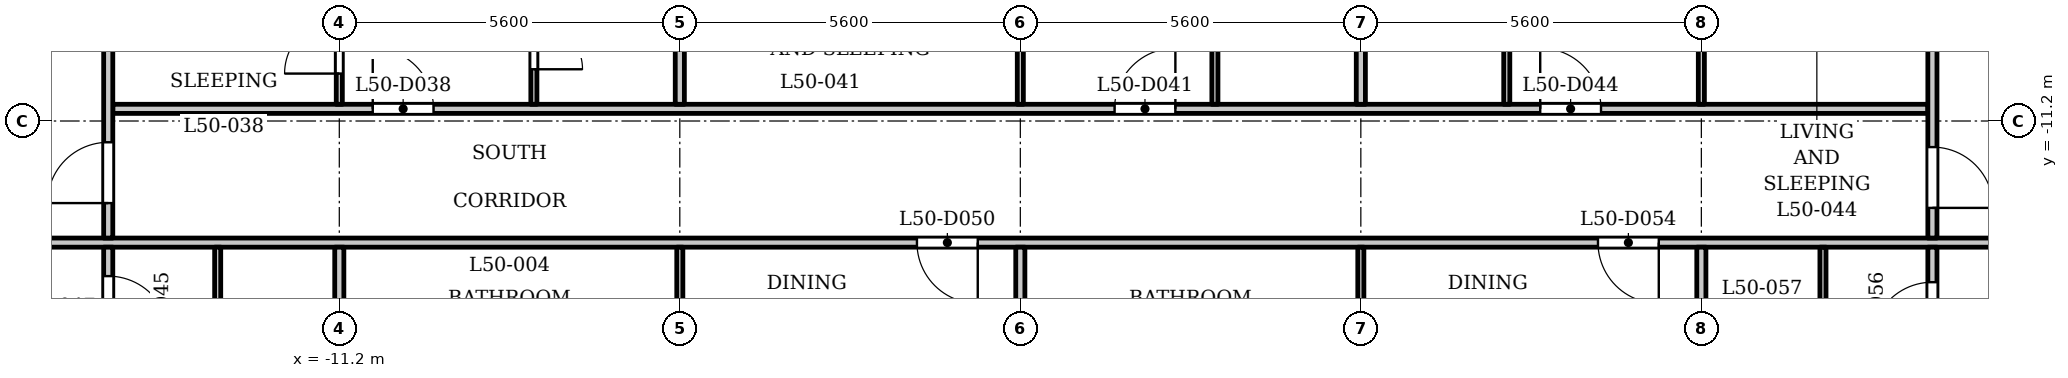
"""IFC4 building model, lengths in metres.
Left out: names, types, materials, properties, quantities, classifications, styles, units other than length and angle.
Written with IfcOpenShell. Run it as: python <this file> out.ifc"""

import sys

from ifc_helpers import new_model, si_unit, direction, frame, frame_2d, origin, place, context, subcontext, project, spatial, rectangle, extrude, element, fill, save


model = new_model("IFC4")
c1 = context("Model", 3, precision=1e-05, world=origin(), true_north=direction((0.0, 1.0)))
c2 = subcontext(c1, "Body", "Model", "MODEL_VIEW")
j1 = project(units=[si_unit("LENGTHUNIT", "METRE"), si_unit("PLANEANGLEUNIT", "RADIAN")], contexts=[c1])
p1 = place(None, origin())
s1 = spatial("IfcSite", under=j1, at=p1, CompositionType="ELEMENT")
p2 = place(p1, origin())
s2 = spatial("IfcBuilding", under=s1, at=p2, CompositionType="ELEMENT")
p3 = place(p2, frame((0.0, 0.0, 195.9)))
s3 = spatial("IfcBuildingStorey", under=s2, at=p3, CompositionType="ELEMENT", Elevation=195.9)
p4 = place(p3, frame((-17.4, -13.2, 0.0), z_axis=(0.0, 0.0, 1.0), x_axis=(1.0, 0.0, 0.0)))
e1 = element("IfcWall", 1, at=p4, inside=s3, PredefinedType="PARTITIONING", context=c2, shape_type="SweptSolid", body=[
    extrude(rectangle(XDim=34.8, YDim=0.15, at=frame_2d((17.4, 0.0))), origin(), (0.0, 0.0, 1.0), 3.2),
])
p5 = place(p4, frame((0.15, 0.0, 0.0)))
e2 = element("IfcOpeningElement", 2, at=p5, cuts=e1, PredefinedType="OPENING", context=c2, shape_type="SweptSolid", body=[
    extrude(rectangle(XDim=1.0, YDim=2.1, at=frame_2d((0.5, 1.05))), frame((0.0, 0.085, 0.0), z_axis=(0.0, -1.0, 0.0), x_axis=(1.0, 0.0, 0.0)), (0.0, 0.0, 1.0), 0.17),
])
p6 = place(p4, frame((33.55, 0.0, 0.0)))
e3 = element("IfcOpeningElement", 3, at=p6, cuts=e1, PredefinedType="OPENING", context=c2, shape_type="SweptSolid", body=[
    extrude(rectangle(XDim=1.0, YDim=2.1, at=frame_2d((0.5, 1.05))), frame((0.0, 0.085, 0.0), z_axis=(0.0, -1.0, 0.0), x_axis=(1.0, 0.0, 0.0)), (0.0, 0.0, 1.0), 0.17),
])
p7 = place(p4, frame((15.7, 0.0, 0.0)))
e4 = element("IfcOpeningElement", 4, at=p7, cuts=e1, PredefinedType="OPENING", context=c2, shape_type="SweptSolid", body=[
    extrude(rectangle(XDim=1.0, YDim=2.1, at=frame_2d((0.5, 1.05))), frame((0.0, 0.085, 0.0), z_axis=(0.0, -1.0, 0.0), x_axis=(1.0, 0.0, 0.0)), (0.0, 0.0, 1.0), 0.17),
])
p8 = place(p4, frame((26.9, 0.0, 0.0)))
e5 = element("IfcOpeningElement", 5, at=p8, cuts=e1, PredefinedType="OPENING", context=c2, shape_type="SweptSolid", body=[
    extrude(rectangle(XDim=1.0, YDim=2.1, at=frame_2d((0.5, 1.05))), frame((0.0, 0.085, 0.0), z_axis=(0.0, -1.0, 0.0), x_axis=(1.0, 0.0, 0.0)), (0.0, 0.0, 1.0), 0.17),
])
p9 = place(p3, frame((-14.925, -11.0, 0.0), z_axis=(0.0, 0.0, 1.0), x_axis=(1.0, 0.0, 0.0)))
e6 = element("IfcWall", 6, at=p9, inside=s3, PredefinedType="PARTITIONING", context=c2, shape_type="SweptSolid", body=[
    extrude(rectangle(XDim=29.85, YDim=0.15, at=frame_2d((14.925, 0.0))), origin(), (0.0, 0.0, 1.0), 3.2),
])
p10 = place(p9, frame((4.275, 0.0, 0.0)))
e7 = element("IfcOpeningElement", 7, at=p10, cuts=e6, PredefinedType="OPENING", context=c2, shape_type="SweptSolid", body=[
    extrude(rectangle(XDim=1.0, YDim=2.1, at=frame_2d((0.5, 1.05))), frame((0.0, 0.085, 0.0), z_axis=(0.0, -1.0, 0.0), x_axis=(1.0, 0.0, 0.0)), (0.0, 0.0, 1.0), 0.17),
])
p11 = place(p9, frame((16.475, 0.0, 0.0)))
e8 = element("IfcOpeningElement", 8, at=p11, cuts=e6, PredefinedType="OPENING", context=c2, shape_type="SweptSolid", body=[
    extrude(rectangle(XDim=1.0, YDim=2.1, at=frame_2d((0.5, 1.05))), frame((0.0, 0.085, 0.0), z_axis=(0.0, -1.0, 0.0), x_axis=(1.0, 0.0, 0.0)), (0.0, 0.0, 1.0), 0.17),
])
p12 = place(p9, frame((23.475, 0.0, 0.0)))
e9 = element("IfcOpeningElement", 9, at=p12, cuts=e6, PredefinedType="OPENING", context=c2, shape_type="SweptSolid", body=[
    extrude(rectangle(XDim=1.0, YDim=2.1, at=frame_2d((0.5, 1.05))), frame((0.0, 0.085, 0.0), z_axis=(0.0, -1.0, 0.0), x_axis=(1.0, 0.0, 0.0)), (0.0, 0.0, 1.0), 0.17),
])
p13 = place(p3, frame((-15.0, -15.325, 0.0), z_axis=(0.0, 0.0, 1.0), x_axis=(0.0, 1.0, 0.0)))
e10 = element("IfcWall", 10, at=p13, inside=s3, PredefinedType="PARTITIONING", context=c2, shape_type="SweptSolid", body=[
    extrude(rectangle(XDim=2.05, YDim=0.15, at=frame_2d((1.025, 0.0))), origin(), (0.0, 0.0, 1.0), 3.2),
])
p14 = place(p13, frame((0.574, 0.0, 0.0)))
e11 = element("IfcOpeningElement", 11, at=p14, cuts=e10, PredefinedType="OPENING", context=c2, shape_type="SweptSolid", body=[
    extrude(rectangle(XDim=1.0, YDim=2.1, at=frame_2d((0.5, 1.05))), frame((0.0, 0.085, 0.0), z_axis=(0.0, -1.0, 0.0), x_axis=(1.0, 0.0, 0.0)), (0.0, 0.0, 1.0), 0.17),
])
p15 = place(p3, frame((-15.0, -13.125, 0.0), z_axis=(0.0, 0.0, 1.0), x_axis=(0.0, 1.0, 0.0)))
e12 = element("IfcWall", 12, at=p15, inside=s3, PredefinedType="PARTITIONING", context=c2, shape_type="SweptSolid", body=[
    extrude(rectangle(XDim=6.356, YDim=0.15, at=frame_2d((3.178, 0.0))), origin(), (0.0, 0.0, 1.0), 3.2),
])
p16 = place(p15, frame((0.575, 0.0, 0.0)))
e13 = element("IfcOpeningElement", 13, at=p16, cuts=e12, PredefinedType="OPENING", context=c2, shape_type="SweptSolid", body=[
    extrude(rectangle(XDim=1.0, YDim=2.1, at=frame_2d((0.5, 1.05))), frame((0.0, 0.085, 0.0), z_axis=(0.0, -1.0, 0.0), x_axis=(1.0, 0.0, 0.0)), (0.0, 0.0, 1.0), 0.17),
])
p17 = place(p3, frame((-13.2, -15.55, 0.0), z_axis=(0.0, 0.0, 1.0), x_axis=(0.0, 1.0, 0.0)))
e14 = element("IfcWall", 14, at=p17, inside=s3, PredefinedType="PARTITIONING", context=c2, shape_type="SweptSolid", body=[
    extrude(rectangle(XDim=2.275, YDim=0.1, at=frame_2d((1.138, 0.0))), origin(), (0.0, 0.0, 1.0), 3.2),
])
p18 = place(p3, frame((-11.2, -10.925, 0.0), z_axis=(0.0, 0.0, 1.0), x_axis=(0.0, 1.0, 0.0)))
e15 = element("IfcWall", 15, at=p18, inside=s3, PredefinedType="PARTITIONING", context=c2, shape_type="SweptSolid", body=[
    extrude(rectangle(XDim=3.605, YDim=0.1, at=frame_2d((1.802, 0.0))), origin(), (0.0, 0.0, 1.0), 3.2),
])
p19 = place(p18, frame((0.505, 0.0, 0.0)))
e16 = element("IfcOpeningElement", 16, at=p19, cuts=e15, PredefinedType="OPENING", context=c2, shape_type="SweptSolid", body=[
    extrude(rectangle(XDim=0.9, YDim=2.1, at=frame_2d((0.45, 1.05))), frame((0.0, 0.06, 0.0), z_axis=(0.0, -1.0, 0.0), x_axis=(1.0, 0.0, 0.0)), (0.0, 0.0, 1.0), 0.12),
])
p20 = place(p3, frame((-11.2, -15.55, 0.0), z_axis=(0.0, 0.0, 1.0), x_axis=(0.0, 1.0, 0.0)))
e17 = element("IfcWall", 17, at=p20, inside=s3, PredefinedType="PARTITIONING", context=c2, shape_type="SweptSolid", body=[
    extrude(rectangle(XDim=2.275, YDim=0.15, at=frame_2d((1.138, 0.0))), origin(), (0.0, 0.0, 1.0), 3.2),
])
p21 = place(p3, frame((-8.0, -10.925, 0.0), z_axis=(0.0, 0.0, 1.0), x_axis=(0.0, 1.0, 0.0)))
e18 = element("IfcWall", 18, at=p21, inside=s3, PredefinedType="PARTITIONING", context=c2, shape_type="SweptSolid", body=[
    extrude(rectangle(XDim=3.605, YDim=0.1, at=frame_2d((1.802, 0.0))), origin(), (0.0, 0.0, 1.0), 3.2),
])
p22 = place(p21, frame((0.576, 0.0, 0.0)))
e19 = element("IfcOpeningElement", 19, at=p22, cuts=e18, PredefinedType="OPENING", context=c2, shape_type="SweptSolid", body=[
    extrude(rectangle(XDim=0.8, YDim=2.1, at=frame_2d((0.4, 1.05))), frame((0.0, 0.06, 0.0), z_axis=(0.0, -1.0, 0.0), x_axis=(1.0, 0.0, 0.0)), (0.0, 0.0, 1.0), 0.12),
])
p23 = place(p3, frame((-5.6, -15.55, 0.0), z_axis=(0.0, 0.0, 1.0), x_axis=(0.0, 1.0, 0.0)))
e20 = element("IfcWall", 20, at=p23, inside=s3, PredefinedType="PARTITIONING", context=c2, shape_type="SweptSolid", body=[
    extrude(rectangle(XDim=2.275, YDim=0.1, at=frame_2d((1.138, 0.0))), origin(), (0.0, 0.0, 1.0), 3.2),
])
p24 = place(p3, frame((-5.6, -10.925, 0.0), z_axis=(0.0, 0.0, 1.0), x_axis=(0.0, 1.0, 0.0)))
e21 = element("IfcWall", 21, at=p24, inside=s3, PredefinedType="PARTITIONING", context=c2, shape_type="SweptSolid", body=[
    extrude(rectangle(XDim=3.605, YDim=0.15, at=frame_2d((1.802, 0.0))), origin(), (0.0, 0.0, 1.0), 3.2),
])
p25 = place(p3, frame((0.0, -10.925, 0.0), z_axis=(0.0, 0.0, 1.0), x_axis=(0.0, 1.0, 0.0)))
e22 = element("IfcWall", 22, at=p25, inside=s3, PredefinedType="PARTITIONING", context=c2, shape_type="SweptSolid", body=[
    extrude(rectangle(XDim=3.605, YDim=0.1, at=frame_2d((1.802, 0.0))), origin(), (0.0, 0.0, 1.0), 3.2),
])
p26 = place(p25, frame((1.005, 0.0, 0.0)))
e23 = element("IfcOpeningElement", 23, at=p26, cuts=e22, PredefinedType="OPENING", context=c2, shape_type="SweptSolid", body=[
    extrude(rectangle(XDim=0.9, YDim=2.1, at=frame_2d((0.45, 1.05))), frame((0.0, 0.06, 0.0), z_axis=(0.0, -1.0, 0.0), x_axis=(1.0, 0.0, 0.0)), (0.0, 0.0, 1.0), 0.12),
])
p27 = place(p3, frame((0.0, -15.55, 0.0), z_axis=(0.0, 0.0, 1.0), x_axis=(0.0, 1.0, 0.0)))
e24 = element("IfcWall", 24, at=p27, inside=s3, PredefinedType="PARTITIONING", context=c2, shape_type="SweptSolid", body=[
    extrude(rectangle(XDim=2.275, YDim=0.15, at=frame_2d((1.138, 0.0))), origin(), (0.0, 0.0, 1.0), 3.2),
])
p28 = place(p3, frame((3.2, -10.925, 0.0), z_axis=(0.0, 0.0, 1.0), x_axis=(0.0, 1.0, 0.0)))
e25 = element("IfcWall", 25, at=p28, inside=s3, PredefinedType="PARTITIONING", context=c2, shape_type="SweptSolid", body=[
    extrude(rectangle(XDim=3.605, YDim=0.1, at=frame_2d((1.802, 0.0))), origin(), (0.0, 0.0, 1.0), 3.2),
])
p29 = place(p28, frame((2.326, 0.0, 0.0)))
e26 = element("IfcOpeningElement", 26, at=p29, cuts=e25, PredefinedType="OPENING", context=c2, shape_type="SweptSolid", body=[
    extrude(rectangle(XDim=0.8, YDim=2.1, at=frame_2d((0.4, 1.05))), frame((0.0, 0.06, 0.0), z_axis=(0.0, -1.0, 0.0), x_axis=(1.0, 0.0, 0.0)), (0.0, 0.0, 1.0), 0.12),
])
p30 = place(p3, frame((5.6, -15.55, 0.0), z_axis=(0.0, 0.0, 1.0), x_axis=(0.0, 1.0, 0.0)))
e27 = element("IfcWall", 27, at=p30, inside=s3, PredefinedType="PARTITIONING", context=c2, shape_type="SweptSolid", body=[
    extrude(rectangle(XDim=2.275, YDim=0.1, at=frame_2d((1.138, 0.0))), origin(), (0.0, 0.0, 1.0), 3.2),
])
p31 = place(p3, frame((5.6, -10.925, 0.0), z_axis=(0.0, 0.0, 1.0), x_axis=(0.0, 1.0, 0.0)))
e28 = element("IfcWall", 28, at=p31, inside=s3, PredefinedType="PARTITIONING", context=c2, shape_type="SweptSolid", body=[
    extrude(rectangle(XDim=3.605, YDim=0.15, at=frame_2d((1.802, 0.0))), origin(), (0.0, 0.0, 1.0), 3.2),
])
p32 = place(p3, frame((8.0, -10.925, 0.0), z_axis=(0.0, 0.0, 1.0), x_axis=(0.0, 1.0, 0.0)))
e29 = element("IfcWall", 29, at=p32, inside=s3, PredefinedType="PARTITIONING", context=c2, shape_type="SweptSolid", body=[
    extrude(rectangle(XDim=3.605, YDim=0.1, at=frame_2d((1.802, 0.0))), origin(), (0.0, 0.0, 1.0), 3.2),
])
p33 = place(p32, frame((2.355, 0.0, 0.0)))
e30 = element("IfcOpeningElement", 30, at=p33, cuts=e29, PredefinedType="OPENING", context=c2, shape_type="SweptSolid", body=[
    extrude(rectangle(XDim=0.8, YDim=2.1, at=frame_2d((0.4, 1.05))), frame((0.0, 0.06, 0.0), z_axis=(0.0, -1.0, 0.0), x_axis=(1.0, 0.0, 0.0)), (0.0, 0.0, 1.0), 0.12),
])
p34 = place(p3, frame((11.2, -10.925, 0.0), z_axis=(0.0, 0.0, 1.0), x_axis=(0.0, 1.0, 0.0)))
e31 = element("IfcWall", 31, at=p34, inside=s3, PredefinedType="PARTITIONING", context=c2, shape_type="SweptSolid", body=[
    extrude(rectangle(XDim=3.605, YDim=0.1, at=frame_2d((1.802, 0.0))), origin(), (0.0, 0.0, 1.0), 3.2),
])
p35 = place(p34, frame((1.076, 0.0, 0.0)))
e32 = element("IfcOpeningElement", 32, at=p35, cuts=e31, PredefinedType="OPENING", context=c2, shape_type="SweptSolid", body=[
    extrude(rectangle(XDim=0.9, YDim=2.1, at=frame_2d((0.45, 1.05))), frame((0.0, 0.06, 0.0), z_axis=(0.0, -1.0, 0.0), x_axis=(1.0, 0.0, 0.0)), (0.0, 0.0, 1.0), 0.12),
])
p36 = place(p3, frame((11.2, -15.55, 0.0), z_axis=(0.0, 0.0, 1.0), x_axis=(0.0, 1.0, 0.0)))
e33 = element("IfcWall", 33, at=p36, inside=s3, PredefinedType="PARTITIONING", context=c2, shape_type="SweptSolid", body=[
    extrude(rectangle(XDim=2.275, YDim=0.15, at=frame_2d((1.138, 0.0))), origin(), (0.0, 0.0, 1.0), 3.2),
])
p37 = place(p3, frame((13.2, -15.55, 0.0), z_axis=(0.0, 0.0, 1.0), x_axis=(0.0, 1.0, 0.0)))
e34 = element("IfcWall", 34, at=p37, inside=s3, PredefinedType="PARTITIONING", context=c2, shape_type="SweptSolid", body=[
    extrude(rectangle(XDim=2.275, YDim=0.1, at=frame_2d((1.138, 0.0))), origin(), (0.0, 0.0, 1.0), 3.2),
])
p38 = place(p3, frame((15.0, -15.325, 0.0), z_axis=(0.0, 0.0, 1.0), x_axis=(0.0, 1.0, 0.0)))
e35 = element("IfcWall", 35, at=p38, inside=s3, PredefinedType="PARTITIONING", context=c2, shape_type="SweptSolid", body=[
    extrude(rectangle(XDim=2.05, YDim=0.15, at=frame_2d((1.025, 0.0))), origin(), (0.0, 0.0, 1.0), 3.2),
])
p39 = place(p38, frame((0.474, 0.0, 0.0)))
e36 = element("IfcOpeningElement", 36, at=p39, cuts=e35, PredefinedType="OPENING", context=c2, shape_type="SweptSolid", body=[
    extrude(rectangle(XDim=1.0, YDim=2.1, at=frame_2d((0.5, 1.05))), frame((0.0, 0.085, 0.0), z_axis=(0.0, -1.0, 0.0), x_axis=(1.0, 0.0, 0.0)), (0.0, 0.0, 1.0), 0.17),
])
p40 = place(p3, frame((15.0, -13.125, 0.0), z_axis=(0.0, 0.0, 1.0), x_axis=(0.0, 1.0, 0.0)))
e37 = element("IfcWall", 37, at=p40, inside=s3, PredefinedType="PARTITIONING", context=c2, shape_type="SweptSolid", body=[
    extrude(rectangle(XDim=6.356, YDim=0.15, at=frame_2d((3.178, 0.0))), origin(), (0.0, 0.0, 1.0), 3.2),
])
p41 = place(p40, frame((0.496, 0.0, 0.0)))
e38 = element("IfcOpeningElement", 38, at=p41, cuts=e37, PredefinedType="OPENING", context=c2, shape_type="SweptSolid", body=[
    extrude(rectangle(XDim=1.0, YDim=2.1, at=frame_2d((0.5, 1.05))), frame((0.0, 0.085, 0.0), z_axis=(0.0, -1.0, 0.0), x_axis=(1.0, 0.0, 0.0)), (0.0, 0.0, 1.0), 0.17),
])
p42 = place(p16, origin())
e39 = element("IfcDoor", 39, at=p42, inside=s3, OperationType="SINGLE_SWING_RIGHT", PredefinedType="DOOR", context=c2, shape_type="SweptSolid", body=[
    extrude(rectangle(XDim=1.0, YDim=2.1, at=frame_2d((0.5, 1.05))), frame((0.0, 0.025, 0.0), z_axis=(0.0, -1.0, 0.0), x_axis=(1.0, 0.0, 0.0)), (0.0, 0.0, 1.0), 0.05),
])
fill(e13, e39)
p43 = place(p41, origin())
e40 = element("IfcDoor", 40, at=p43, inside=s3, OperationType="SINGLE_SWING_LEFT", PredefinedType="DOOR", context=c2, shape_type="SweptSolid", body=[
    extrude(rectangle(XDim=1.0, YDim=2.1, at=frame_2d((0.5, 1.05))), frame((0.0, 0.025, 0.0), z_axis=(0.0, -1.0, 0.0), x_axis=(1.0, 0.0, 0.0)), (0.0, 0.0, 1.0), 0.05),
])
fill(e38, e40)
p44 = place(p10, origin())
e41 = element("IfcDoor", 41, at=p44, inside=s3, OperationType="SINGLE_SWING_RIGHT", PredefinedType="DOOR", context=c2, shape_type="SweptSolid", body=[
    extrude(rectangle(XDim=1.0, YDim=2.1, at=frame_2d((0.5, 1.05))), frame((0.0, 0.025, 0.0), z_axis=(0.0, -1.0, 0.0), x_axis=(1.0, 0.0, 0.0)), (0.0, 0.0, 1.0), 0.05),
])
fill(e7, e41)
p45 = place(p22, origin())
e42 = element("IfcDoor", 42, at=p45, inside=s3, OperationType="SINGLE_SWING_LEFT", PredefinedType="DOOR", context=c2, shape_type="SweptSolid", body=[
    extrude(rectangle(XDim=0.8, YDim=2.1, at=frame_2d((0.4, 1.05))), frame((0.0, 0.025, 0.0), z_axis=(0.0, -1.0, 0.0), x_axis=(1.0, 0.0, 0.0)), (0.0, 0.0, 1.0), 0.05),
])
fill(e19, e42)
p46 = place(p19, origin())
e43 = element("IfcDoor", 43, at=p46, inside=s3, OperationType="SINGLE_SWING_RIGHT", PredefinedType="DOOR", context=c2, shape_type="SweptSolid", body=[
    extrude(rectangle(XDim=0.9, YDim=2.1, at=frame_2d((0.45, 1.05))), frame((0.0, 0.025, 0.0), z_axis=(0.0, -1.0, 0.0), x_axis=(1.0, 0.0, 0.0)), (0.0, 0.0, 1.0), 0.05),
])
fill(e16, e43)
p47 = place(p11, origin())
e44 = element("IfcDoor", 44, at=p47, inside=s3, OperationType="SINGLE_SWING_LEFT", PredefinedType="DOOR", context=c2, shape_type="SweptSolid", body=[
    extrude(rectangle(XDim=1.0, YDim=2.1, at=frame_2d((0.5, 1.05))), frame((0.0, 0.025, 0.0), z_axis=(0.0, -1.0, 0.0), x_axis=(1.0, 0.0, 0.0)), (0.0, 0.0, 1.0), 0.05),
])
fill(e8, e44)
p48 = place(p12, origin())
e45 = element("IfcDoor", 45, at=p48, inside=s3, OperationType="SINGLE_SWING_RIGHT", PredefinedType="DOOR", context=c2, shape_type="SweptSolid", body=[
    extrude(rectangle(XDim=1.0, YDim=2.1, at=frame_2d((0.5, 1.05))), frame((0.0, 0.025, 0.0), z_axis=(0.0, -1.0, 0.0), x_axis=(1.0, 0.0, 0.0)), (0.0, 0.0, 1.0), 0.05),
])
fill(e9, e45)
p49 = place(p14, origin())
e46 = element("IfcDoor", 46, at=p49, inside=s3, OperationType="SINGLE_SWING_LEFT", PredefinedType="DOOR", context=c2, shape_type="SweptSolid", body=[
    extrude(rectangle(XDim=1.0, YDim=2.1, at=frame_2d((0.5, 1.05))), frame((0.0, 0.025, 0.0), z_axis=(0.0, -1.0, 0.0), x_axis=(1.0, 0.0, 0.0)), (0.0, 0.0, 1.0), 0.05),
])
fill(e11, e46)
p50 = place(p7, origin())
e47 = element("IfcDoor", 47, at=p50, inside=s3, OperationType="SINGLE_SWING_RIGHT", PredefinedType="DOOR", context=c2, shape_type="SweptSolid", body=[
    extrude(rectangle(XDim=1.0, YDim=2.1, at=frame_2d((0.5, 1.05))), frame((0.0, 0.025, 0.0), z_axis=(0.0, -1.0, 0.0), x_axis=(1.0, 0.0, 0.0)), (0.0, 0.0, 1.0), 0.05),
])
fill(e4, e47)
p51 = place(p8, origin())
e48 = element("IfcDoor", 48, at=p51, inside=s3, OperationType="SINGLE_SWING_RIGHT", PredefinedType="DOOR", context=c2, shape_type="SweptSolid", body=[
    extrude(rectangle(XDim=1.0, YDim=2.1, at=frame_2d((0.5, 1.05))), frame((0.0, 0.025, 0.0), z_axis=(0.0, -1.0, 0.0), x_axis=(1.0, 0.0, 0.0)), (0.0, 0.0, 1.0), 0.05),
])
fill(e5, e48)
p52 = place(p39, origin())
e49 = element("IfcDoor", 49, at=p52, inside=s3, OperationType="SINGLE_SWING_RIGHT", PredefinedType="DOOR", context=c2, shape_type="SweptSolid", body=[
    extrude(rectangle(XDim=1.0, YDim=2.1, at=frame_2d((0.5, 1.05))), frame((0.0, 0.025, 0.0), z_axis=(0.0, -1.0, 0.0), x_axis=(1.0, 0.0, 0.0)), (0.0, 0.0, 1.0), 0.05),
])
fill(e36, e49)
save(model, sys.argv[1])
